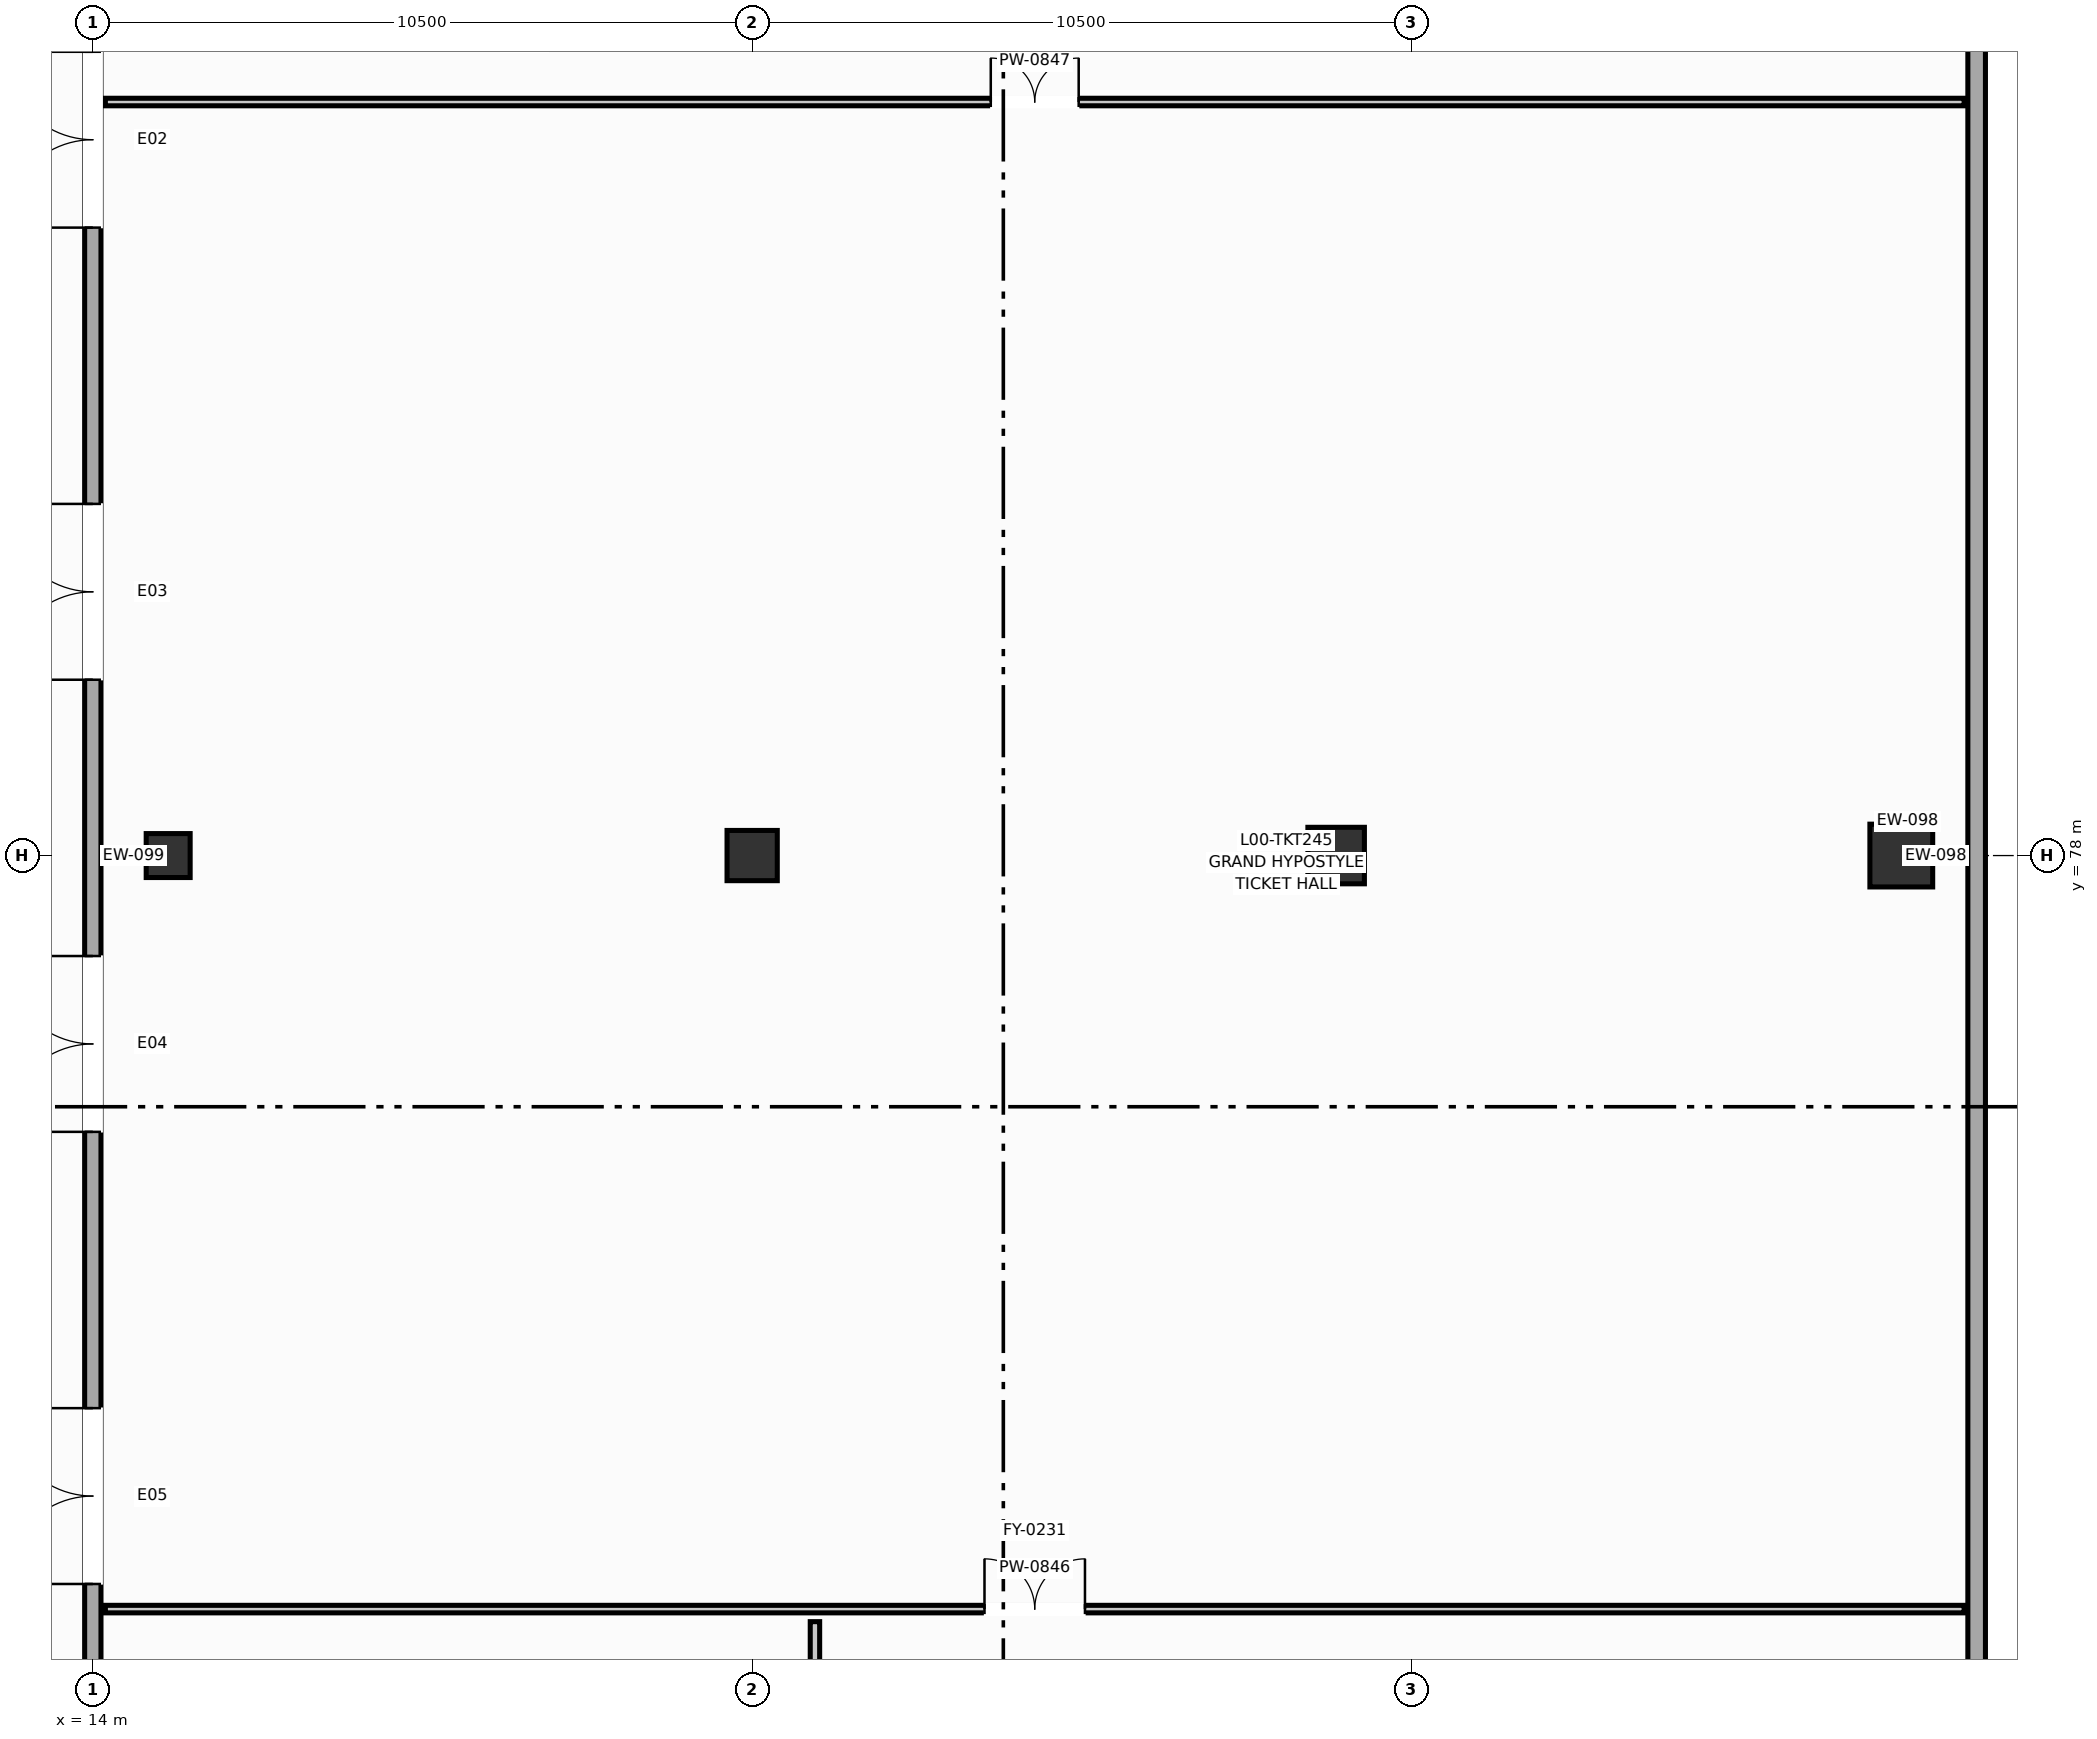
"""IFC4 building model, lengths in metres.
Left out: names, types, materials, properties, quantities, classifications, styles, units other than length and angle.
Written with IfcOpenShell. Run it as: python <this file> out.ifc"""

import sys

from ifc_helpers import new_model, si_unit, direction, frame, frame_2d, origin, origin_2d, place, context, subcontext, project, spatial, rectangle, circle, extrude, element, fill, save


model = new_model("IFC4")
c1 = context("Model", 3, precision=1e-05, world=origin(), true_north=direction((0.0, 1.0)))
c2 = subcontext(c1, "Body", "Model", "MODEL_VIEW")
j1 = project(units=[si_unit("LENGTHUNIT", "METRE"), si_unit("PLANEANGLEUNIT", "RADIAN")], contexts=[c1])
p1 = place(None, origin())
s1 = spatial("IfcSite", under=j1, at=p1, CompositionType="ELEMENT")
p2 = place(p1, origin())
s2 = spatial("IfcBuilding", under=s1, at=p2, CompositionType="ELEMENT")
p3 = place(p2, origin())
s3 = spatial("IfcBuildingStorey", under=s2, at=p3, CompositionType="ELEMENT", Elevation=0.0)
p4 = place(p3, frame((15.2, 78.0, 0.0), z_axis=(0.0, 0.0, 1.0), x_axis=(1.0, 0.0, 0.0)))
e1 = element("IfcColumn", 1, at=p4, inside=s3, PredefinedType="COLUMN", context=c2, shape_type="SweptSolid", body=[
    extrude(circle(Radius=0.35, at=origin_2d()), origin(), (0.0, 0.0, 1.0), 4.5),
])
p5 = place(p3, frame((24.5, 78.0, 0.0), z_axis=(0.0, 0.0, 1.0), x_axis=(1.0, 0.0, 0.0)))
e2 = element("IfcColumn", 2, at=p5, inside=s3, PredefinedType="COLUMN", context=c2, shape_type="SweptSolid", body=[
    extrude(circle(Radius=0.4, at=origin_2d()), origin(), (0.0, 0.0, 1.0), 4.5),
])
p6 = place(p3, frame((33.8, 78.0, 0.0), z_axis=(0.0, 0.0, 1.0), x_axis=(1.0, 0.0, 0.0)))
e3 = element("IfcColumn", 3, at=p6, inside=s3, PredefinedType="COLUMN", context=c2, shape_type="SweptSolid", body=[
    extrude(circle(Radius=0.45, at=origin_2d()), origin(), (0.0, 0.0, 1.0), 4.5),
])
p7 = place(p3, frame((42.8, 78.0, 0.0), z_axis=(0.0, 0.0, 1.0), x_axis=(1.0, 0.0, 0.0)))
e4 = element("IfcColumn", 4, at=p7, inside=s3, PredefinedType="COLUMN", context=c2, shape_type="SweptSolid", body=[
    extrude(circle(Radius=0.5, at=origin_2d()), origin(), (0.0, 0.0, 1.0), 4.5),
])
p8 = place(p3, frame((44.0, 50.0, 0.0), z_axis=(0.0, 0.0, 1.0), x_axis=(0.0, 1.0, 0.0)))
e5 = element("IfcWall", 5, at=p8, inside=s3, PredefinedType="SOLIDWALL", context=c2, shape_type="SweptSolid", body=[
    extrude(rectangle(XDim=56.0, YDim=0.28, at=frame_2d((28.0, 0.0))), origin(), (0.0, 0.0, 1.0), 3.55),
])
p9 = place(p8, frame((11.2, 0.0, 0.0)))
e6 = element("IfcOpeningElement", 6, at=p9, cuts=e5, PredefinedType="OPENING", context=c2, shape_type="SweptSolid", body=[
    extrude(rectangle(XDim=1.8, YDim=2.35, at=frame_2d((0.9, 1.175))), frame((0.0, 0.15, 0.0), z_axis=(0.0, -1.0, 0.0), x_axis=(1.0, 0.0, 0.0)), (0.0, 0.0, 1.0), 0.3),
])
p10 = place(p8, frame((43.0, 0.0, 0.0)))
e7 = element("IfcOpeningElement", 7, at=p10, cuts=e5, PredefinedType="OPENING", context=c2, shape_type="SweptSolid", body=[
    extrude(rectangle(XDim=1.8, YDim=2.35, at=frame_2d((0.9, 1.175))), frame((0.0, 0.15, 0.0), z_axis=(0.0, -1.0, 0.0), x_axis=(1.0, 0.0, 0.0)), (0.0, 0.0, 1.0), 0.3),
])
p11 = place(p3, frame((14.0, 101.0, 0.0), z_axis=(0.0, 0.0, 1.0), x_axis=(0.0, -1.0, 0.0)))
e8 = element("IfcWall", 8, at=p11, inside=s3, PredefinedType="SOLIDWALL", context=c2, shape_type="SweptSolid", body=[
    extrude(rectangle(XDim=46.0, YDim=0.26, at=frame_2d((23.0, 0.0))), origin(), (0.0, 0.0, 1.0), 3.55),
])
p12 = place(p11, frame((3.0, 0.0, 0.0)))
e9 = element("IfcOpeningElement", 9, at=p12, cuts=e8, PredefinedType="OPENING", context=c2, shape_type="SweptSolid", body=[
    extrude(rectangle(XDim=2.8, YDim=2.7, at=frame_2d((1.4, 1.35))), frame((0.0, 0.14, 0.0), z_axis=(0.0, -1.0, 0.0), x_axis=(1.0, 0.0, 0.0)), (0.0, 0.0, 1.0), 0.28),
])
p13 = place(p11, frame((10.2, 0.0, 0.0)))
e10 = element("IfcOpeningElement", 10, at=p13, cuts=e8, PredefinedType="OPENING", context=c2, shape_type="SweptSolid", body=[
    extrude(rectangle(XDim=2.8, YDim=2.7, at=frame_2d((1.4, 1.35))), frame((0.0, 0.14, 0.0), z_axis=(0.0, -1.0, 0.0), x_axis=(1.0, 0.0, 0.0)), (0.0, 0.0, 1.0), 0.28),
])
p14 = place(p11, frame((17.4, 0.0, 0.0)))
e11 = element("IfcOpeningElement", 11, at=p14, cuts=e8, PredefinedType="OPENING", context=c2, shape_type="SweptSolid", body=[
    extrude(rectangle(XDim=2.8, YDim=2.7, at=frame_2d((1.4, 1.35))), frame((0.0, 0.14, 0.0), z_axis=(0.0, -1.0, 0.0), x_axis=(1.0, 0.0, 0.0)), (0.0, 0.0, 1.0), 0.28),
])
p15 = place(p11, frame((24.6, 0.0, 0.0)))
e12 = element("IfcOpeningElement", 12, at=p15, cuts=e8, PredefinedType="OPENING", context=c2, shape_type="SweptSolid", body=[
    extrude(rectangle(XDim=2.8, YDim=2.7, at=frame_2d((1.4, 1.35))), frame((0.0, 0.14, 0.0), z_axis=(0.0, -1.0, 0.0), x_axis=(1.0, 0.0, 0.0)), (0.0, 0.0, 1.0), 0.28),
])
p16 = place(p11, frame((31.8, 0.0, 0.0)))
e13 = element("IfcOpeningElement", 13, at=p16, cuts=e8, PredefinedType="OPENING", context=c2, shape_type="SweptSolid", body=[
    extrude(rectangle(XDim=2.8, YDim=2.7, at=frame_2d((1.4, 1.35))), frame((0.0, 0.14, 0.0), z_axis=(0.0, -1.0, 0.0), x_axis=(1.0, 0.0, 0.0)), (0.0, 0.0, 1.0), 0.28),
])
p17 = place(p11, frame((39.0, 0.0, 0.0)))
e14 = element("IfcOpeningElement", 14, at=p17, cuts=e8, PredefinedType="OPENING", context=c2, shape_type="SweptSolid", body=[
    extrude(rectangle(XDim=2.8, YDim=2.7, at=frame_2d((1.4, 1.35))), frame((0.0, 0.14, 0.0), z_axis=(0.0, -1.0, 0.0), x_axis=(1.0, 0.0, 0.0)), (0.0, 0.0, 1.0), 0.28),
])
p18 = place(p3, frame((14.2, 66.0, 0.0), z_axis=(0.0, 0.0, 1.0), x_axis=(1.0, 0.0, 0.0)))
e15 = element("IfcWall", 15, at=p18, inside=s3, PredefinedType="PARTITIONING", context=c2, shape_type="SweptSolid", body=[
    extrude(rectangle(XDim=29.6, YDim=0.12, at=frame_2d((14.8, 0.0))), origin(), (0.0, 0.0, 1.0), 3.22),
])
p19 = place(p18, frame((14.0, 0.0, 0.0)))
e16 = element("IfcOpeningElement", 16, at=p19, cuts=e15, PredefinedType="OPENING", context=c2, shape_type="SweptSolid", body=[
    extrude(rectangle(XDim=1.6, YDim=2.25, at=frame_2d((0.8, 1.125))), frame((0.0, 0.07, 0.0), z_axis=(0.0, -1.0, 0.0), x_axis=(1.0, 0.0, 0.0)), (0.0, 0.0, 1.0), 0.14),
])
p20 = place(p3, frame((14.2, 90.0, 0.0), z_axis=(0.0, 0.0, 1.0), x_axis=(1.0, 0.0, 0.0)))
e17 = element("IfcWall", 17, at=p20, inside=s3, PredefinedType="PARTITIONING", context=c2, shape_type="SweptSolid", body=[
    extrude(rectangle(XDim=29.6, YDim=0.12, at=frame_2d((14.8, 0.0))), origin(), (0.0, 0.0, 1.0), 3.22),
])
p21 = place(p20, frame((14.1, 0.0, 0.0)))
e18 = element("IfcOpeningElement", 18, at=p21, cuts=e17, PredefinedType="OPENING", context=c2, shape_type="SweptSolid", body=[
    extrude(rectangle(XDim=1.4, YDim=2.2, at=frame_2d((0.7, 1.1))), frame((0.0, 0.07, 0.0), z_axis=(0.0, -1.0, 0.0), x_axis=(1.0, 0.0, 0.0)), (0.0, 0.0, 1.0), 0.14),
])
p22 = place(p3, frame((25.5, 56.3, 0.0), z_axis=(0.0, 0.0, 1.0), x_axis=(0.0, 1.0, 0.0)))
e19 = element("IfcWall", 19, at=p22, inside=s3, PredefinedType="PARTITIONING", context=c2, shape_type="SweptSolid", body=[
    extrude(rectangle(XDim=9.5, YDim=0.15, at=frame_2d((4.75, 0.0))), origin(), (0.0, 0.0, 1.0), 3.22),
])
p23 = place(p22, frame((4.24, 0.0, 0.0)))
e20 = element("IfcOpeningElement", 20, at=p23, cuts=e19, PredefinedType="OPENING", context=c2, shape_type="SweptSolid", body=[
    extrude(rectangle(XDim=1.02, YDim=2.15, at=frame_2d((0.51, 1.075))), frame((0.0, 0.085, 0.0), z_axis=(0.0, -1.0, 0.0), x_axis=(1.0, 0.0, 0.0)), (0.0, 0.0, 1.0), 0.17),
])
p24 = place(p13, frame((2.8, 0.0, 0.0), z_axis=(0.0, 0.0, 1.0), x_axis=(-1.0, 0.0, 0.0)))
e21 = element("IfcDoor", 21, at=p24, inside=s3, OperationType="DOUBLE_DOOR_SINGLE_SWING", PredefinedType="DOOR", context=c2, shape_type="SweptSolid", body=[
    extrude(rectangle(XDim=2.8, YDim=2.7, at=frame_2d((1.4, 1.35))), frame((0.0, 0.025, 0.0), z_axis=(0.0, -1.0, 0.0), x_axis=(1.0, 0.0, 0.0)), (0.0, 0.0, 1.0), 0.05),
])
fill(e10, e21)
p25 = place(p14, frame((2.8, 0.0, 0.0), z_axis=(0.0, 0.0, 1.0), x_axis=(-1.0, 0.0, 0.0)))
e22 = element("IfcDoor", 22, at=p25, inside=s3, OperationType="DOUBLE_DOOR_SINGLE_SWING", PredefinedType="DOOR", context=c2, shape_type="SweptSolid", body=[
    extrude(rectangle(XDim=2.8, YDim=2.7, at=frame_2d((1.4, 1.35))), frame((0.0, 0.025, 0.0), z_axis=(0.0, -1.0, 0.0), x_axis=(1.0, 0.0, 0.0)), (0.0, 0.0, 1.0), 0.05),
])
fill(e11, e22)
p26 = place(p15, frame((2.8, 0.0, 0.0), z_axis=(0.0, 0.0, 1.0), x_axis=(-1.0, 0.0, 0.0)))
e23 = element("IfcDoor", 23, at=p26, inside=s3, OperationType="DOUBLE_DOOR_SINGLE_SWING", PredefinedType="DOOR", context=c2, shape_type="SweptSolid", body=[
    extrude(rectangle(XDim=2.8, YDim=2.7, at=frame_2d((1.4, 1.35))), frame((0.0, 0.025, 0.0), z_axis=(0.0, -1.0, 0.0), x_axis=(1.0, 0.0, 0.0)), (0.0, 0.0, 1.0), 0.05),
])
fill(e12, e23)
p27 = place(p16, frame((2.8, 0.0, 0.0), z_axis=(0.0, 0.0, 1.0), x_axis=(-1.0, 0.0, 0.0)))
e24 = element("IfcDoor", 24, at=p27, inside=s3, OperationType="DOUBLE_DOOR_SINGLE_SWING", PredefinedType="DOOR", context=c2, shape_type="SweptSolid", body=[
    extrude(rectangle(XDim=2.8, YDim=2.7, at=frame_2d((1.4, 1.35))), frame((0.0, 0.025, 0.0), z_axis=(0.0, -1.0, 0.0), x_axis=(1.0, 0.0, 0.0)), (0.0, 0.0, 1.0), 0.05),
])
fill(e13, e24)
p28 = place(p19, origin())
e25 = element("IfcDoor", 25, at=p28, inside=s3, OperationType="DOUBLE_DOOR_SINGLE_SWING", PredefinedType="DOOR", context=c2, shape_type="SweptSolid", body=[
    extrude(rectangle(XDim=1.6, YDim=2.25, at=frame_2d((0.8, 1.125))), frame((0.0, 0.025, 0.0), z_axis=(0.0, -1.0, 0.0), x_axis=(1.0, 0.0, 0.0)), (0.0, 0.0, 1.0), 0.05),
])
fill(e16, e25)
p29 = place(p21, origin())
e26 = element("IfcDoor", 26, at=p29, inside=s3, OperationType="DOUBLE_DOOR_SINGLE_SWING", PredefinedType="DOOR", context=c2, shape_type="SweptSolid", body=[
    extrude(rectangle(XDim=1.4, YDim=2.2, at=frame_2d((0.7, 1.1))), frame((0.0, 0.025, 0.0), z_axis=(0.0, -1.0, 0.0), x_axis=(1.0, 0.0, 0.0)), (0.0, 0.0, 1.0), 0.05),
])
fill(e18, e26)
save(model, sys.argv[1])
